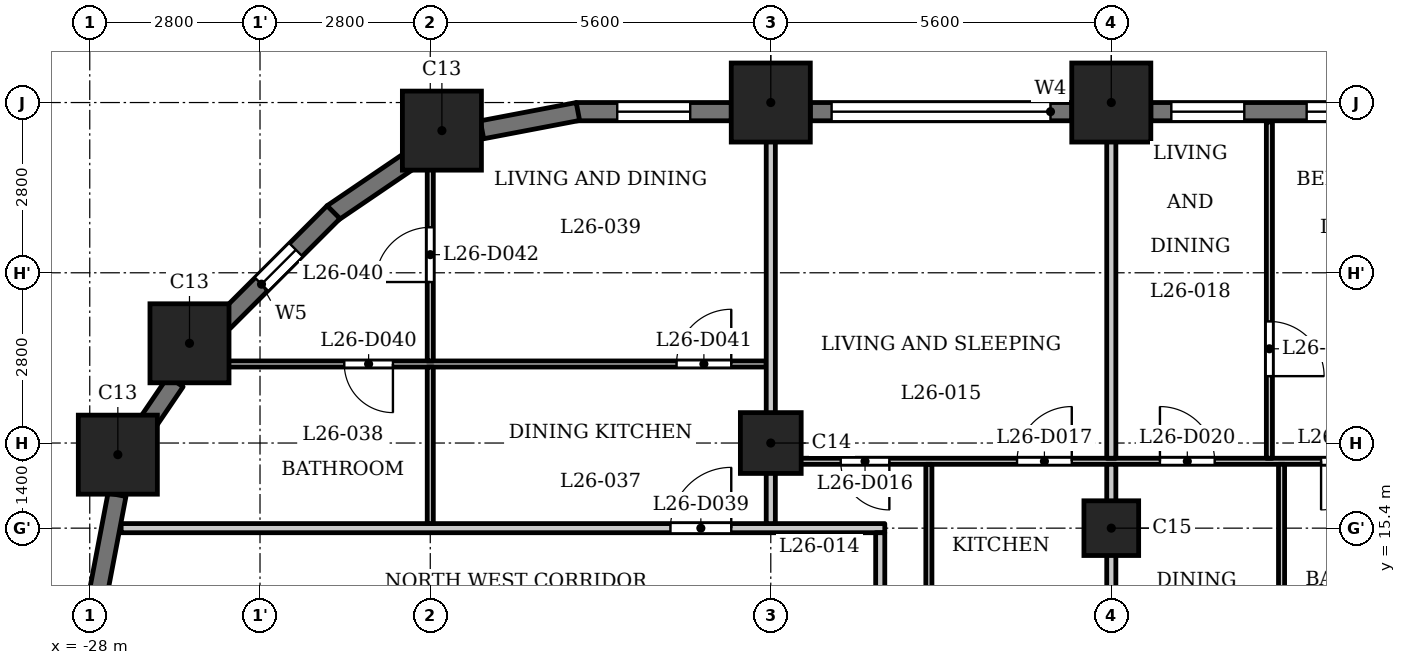
"""IFC4 building model, lengths in metres.
Left out: names, types, materials, properties, quantities, classifications, styles, units other than length and angle.
Written with IfcOpenShell. Run it as: python <this file> out.ifc"""

import sys

from ifc_helpers import new_model, si_unit, direction, frame, frame_2d, origin, origin_2d, place, context, subcontext, project, spatial, rectangle, extrude, element, fill, save


model = new_model("IFC4")
c1 = context("Model", 3, precision=1e-05, world=origin(), true_north=direction((0.0, 1.0)))
c2 = subcontext(c1, "Body", "Model", "MODEL_VIEW")
j1 = project(units=[si_unit("LENGTHUNIT", "METRE"), si_unit("PLANEANGLEUNIT", "RADIAN")], contexts=[c1])
p1 = place(None, origin())
s1 = spatial("IfcSite", under=j1, at=p1, CompositionType="ELEMENT")
p2 = place(p1, origin())
s2 = spatial("IfcBuilding", under=s1, at=p2, CompositionType="ELEMENT")
p3 = place(p2, frame((0.0, 0.0, 104.3)))
s3 = spatial("IfcBuildingStorey", under=s2, at=p3, CompositionType="ELEMENT", Elevation=104.3)
for number, where, z_axis, x_axis in (
    (1, (-11.2, 22.4, 0.0), (0.0, 0.0, 1.0), (1.0, 0.0, 0.0)),
    (2, (-16.8, 22.4, 0.0), (0.0, 0.0, 1.0), (1.0, 0.0, 0.0)),
    (3, (-22.209, 21.938, 0.0), (0.0, 0.0, 1.0), (1.0, 0.0, 0.0)),
    (4, (-26.36, 18.44, 0.0), (0.0, 0.0, 1.0), (1.0, 0.0, 0.0)),
    (5, (-27.538, 16.609, 0.0), (0.0, 0.0, 1.0), (1.0, 0.0, 0.0)),
):
    element("IfcColumn", number, at=place(p3, frame(where, z_axis=z_axis, x_axis=x_axis)), inside=s3, PredefinedType="COLUMN", context=c2, shape_type="SweptSolid", body=[
        extrude(rectangle(XDim=1.3, YDim=1.3, at=origin_2d()), origin(), (0.0, 0.0, 1.0), 3.5),
    ])
p4 = place(p3, frame((-16.8, 16.8, 0.0), z_axis=(0.0, 0.0, 1.0), x_axis=(1.0, 0.0, 0.0)))
e6 = element("IfcColumn", 6, at=p4, inside=s3, PredefinedType="COLUMN", context=c2, shape_type="SweptSolid", body=[
    extrude(rectangle(XDim=1.0, YDim=1.0, at=origin_2d()), origin(), (0.0, 0.0, 1.0), 3.5),
])
p5 = place(p3, frame((-11.2, 15.4, 0.0), z_axis=(0.0, 0.0, 1.0), x_axis=(1.0, 0.0, 0.0)))
e7 = element("IfcColumn", 7, at=p5, inside=s3, PredefinedType="COLUMN", context=c2, shape_type="SweptSolid", body=[
    extrude(rectangle(XDim=0.9, YDim=0.9, at=origin_2d()), origin(), (0.0, 0.0, 1.0), 3.5),
])
p6 = place(p3, frame((-6.25, 22.25, 0.0), z_axis=(0.0, 0.0, 1.0), x_axis=(-1.0, 0.0, 0.0)))
e8 = element("IfcWall", 8, at=p6, inside=s3, PredefinedType="SOLIDWALL", context=c2, shape_type="SweptSolid", body=[
    extrude(rectangle(XDim=4.3, YDim=0.3, at=frame_2d((2.15, 0.0))), origin(), (0.0, 0.0, 1.0), 2.4),
])
p7 = place(p6, frame((0.538, 0.0, 0.6)))
e9 = element("IfcOpeningElement", 9, at=p7, cuts=e8, PredefinedType="OPENING", context=c2, shape_type="SweptSolid", body=[
    extrude(rectangle(XDim=1.2, YDim=1.55, at=frame_2d((0.6, 0.775))), frame((0.0, 0.16, 0.0), z_axis=(0.0, -1.0, 0.0), x_axis=(1.0, 0.0, 0.0)), (0.0, 0.0, 1.0), 0.32),
])
p8 = place(p6, frame((2.762, 0.0, 0.6)))
e10 = element("IfcOpeningElement", 10, at=p8, cuts=e8, PredefinedType="OPENING", context=c2, shape_type="SweptSolid", body=[
    extrude(rectangle(XDim=1.2, YDim=1.55, at=frame_2d((0.6, 0.775))), frame((0.0, 0.16, 0.0), z_axis=(0.0, -1.0, 0.0), x_axis=(1.0, 0.0, 0.0)), (0.0, 0.0, 1.0), 0.32),
])
p9 = place(p3, frame((-11.85, 22.25, 0.0), z_axis=(0.0, 0.0, 1.0), x_axis=(-1.0, 0.0, 0.0)))
e11 = element("IfcWall", 11, at=p9, inside=s3, PredefinedType="SOLIDWALL", context=c2, shape_type="SweptSolid", body=[
    extrude(rectangle(XDim=4.3, YDim=0.3, at=frame_2d((2.15, 0.0))), origin(), (0.0, 0.0, 1.0), 2.4),
])
p10 = place(p9, frame((0.35, 0.0, 1.2)))
e12 = element("IfcOpeningElement", 12, at=p10, cuts=e11, PredefinedType="OPENING", context=c2, shape_type="SweptSolid", body=[
    extrude(rectangle(XDim=3.6, YDim=0.95, at=frame_2d((1.8, 0.475))), frame((0.0, 0.16, 0.0), z_axis=(0.0, -1.0, 0.0), x_axis=(1.0, 0.0, 0.0)), (0.0, 0.0, 1.0), 0.32),
])
p11 = place(p3, frame((-17.45, 22.25, 0.0), z_axis=(0.0, 0.0, 1.0), x_axis=(-1.0, 0.0, 0.0)))
e13 = element("IfcWall", 13, at=p11, inside=s3, PredefinedType="SOLIDWALL", context=c2, shape_type="SweptSolid", body=[
    extrude(rectangle(XDim=2.55, YDim=0.3, at=frame_2d((1.275, 0.0))), origin(), (0.0, 0.0, 1.0), 2.4),
])
p12 = place(p11, frame((0.675, 0.0, 0.6)))
e14 = element("IfcOpeningElement", 14, at=p12, cuts=e13, PredefinedType="OPENING", context=c2, shape_type="SweptSolid", body=[
    extrude(rectangle(XDim=1.2, YDim=1.55, at=frame_2d((0.6, 0.775))), frame((0.0, 0.16, 0.0), z_axis=(0.0, -1.0, 0.0), x_axis=(1.0, 0.0, 0.0)), (0.0, 0.0, 1.0), 0.32),
])
for number, where, z_axis, x_axis in (
    (15, (-19.972, 22.253, 0.0), (0.0, 0.0, 1.0), (-0.982, -0.187, 0.0)),
    (16, (-22.684, 21.482, 0.0), (0.0, 0.0, 1.0), (-0.827, -0.562, 0.0)),
):
    element("IfcWall", number, at=place(p3, frame(where, z_axis=z_axis, x_axis=x_axis)), inside=s3, PredefinedType="SOLIDWALL", context=c2, shape_type="SweptSolid", body=[
        extrude(rectangle(XDim=1.606, YDim=0.3, at=frame_2d((0.803, 0.0))), origin(), (0.0, 0.0, 1.0), 2.4),
    ])
p13 = place(p3, frame((-23.991, 20.597, 0.0), z_axis=(0.0, 0.0, 1.0), x_axis=(-0.707106781187, -0.707106781187, 0.0)))
e17 = element("IfcWall", 17, at=p13, inside=s3, PredefinedType="SOLIDWALL", context=c2, shape_type="SweptSolid", body=[
    extrude(rectangle(XDim=2.55, YDim=0.3, at=frame_2d((1.275, 0.0))), origin(), (0.0, 0.0, 1.0), 2.4),
])
p14 = place(p13, frame((0.875, 0.0, 0.6)))
e18 = element("IfcOpeningElement", 18, at=p14, cuts=e17, PredefinedType="OPENING", context=c2, shape_type="SweptSolid", body=[
    extrude(rectangle(XDim=0.8, YDim=1.55, at=frame_2d((0.4, 0.775))), frame((0.0, 0.16, 0.0), z_axis=(0.0, -1.0, 0.0), x_axis=(1.0, 0.0, 0.0)), (0.0, 0.0, 1.0), 0.32),
])
p15 = place(p3, frame((-26.589, 17.81, 0.0), z_axis=(0.0, 0.0, 1.0), x_axis=(-0.562066330934, -0.827092159091, 0.0)))
e19 = element("IfcWall", 19, at=p15, inside=s3, PredefinedType="SOLIDWALL", context=c2, shape_type="SweptSolid", body=[
    extrude(rectangle(XDim=0.877, YDim=0.3, at=frame_2d((0.438, 0.0))), origin(), (0.0, 0.0, 1.0), 3.2),
])
p16 = place(p3, frame((-27.552, 15.949, 0.0), z_axis=(0.0, 0.0, 1.0), x_axis=(-0.187279751651, -0.982306619453, 0.0)))
e20 = element("IfcWall", 20, at=p16, inside=s3, PredefinedType="SOLIDWALL", context=c2, shape_type="SweptSolid", body=[
    extrude(rectangle(XDim=1.606, YDim=0.3, at=frame_2d((0.803, 0.0))), origin(), (0.0, 0.0, 1.0), 2.4),
])
p17 = place(p3, frame((-27.484, 15.4, 0.0), z_axis=(0.0, 0.0, 1.0), x_axis=(1.0, 0.0, 0.0)))
e21 = element("IfcWall", 21, at=p17, inside=s3, PredefinedType="PARTITIONING", context=c2, shape_type="SweptSolid", body=[
    extrude(rectangle(XDim=12.559, YDim=0.15, at=frame_2d((6.279, 0.0))), origin(), (0.0, 0.0, 1.0), 3.2),
])
p18 = place(p17, frame((9.034, 0.0, 0.0)))
e22 = element("IfcOpeningElement", 22, at=p18, cuts=e21, PredefinedType="OPENING", context=c2, shape_type="SweptSolid", body=[
    extrude(rectangle(XDim=1.0, YDim=2.1, at=frame_2d((0.5, 1.05))), frame((0.0, 0.085, 0.0), z_axis=(0.0, -1.0, 0.0), x_axis=(1.0, 0.0, 0.0)), (0.0, 0.0, 1.0), 0.17),
])
p19 = place(p3, frame((-16.725, 16.5, 0.0), z_axis=(0.0, 0.0, 1.0), x_axis=(1.0, 0.0, 0.0)))
e23 = element("IfcWall", 23, at=p19, inside=s3, PredefinedType="PARTITIONING", context=c2, shape_type="SweptSolid", body=[
    extrude(rectangle(XDim=33.45, YDim=0.1, at=frame_2d((16.725, 0.0))), origin(), (0.0, 0.0, 1.0), 3.2),
])
p20 = place(p19, frame((1.075, 0.0, 0.0)))
e24 = element("IfcOpeningElement", 24, at=p20, cuts=e23, PredefinedType="OPENING", context=c2, shape_type="SweptSolid", body=[
    extrude(rectangle(XDim=0.8, YDim=2.1, at=frame_2d((0.4, 1.05))), frame((0.0, 0.06, 0.0), z_axis=(0.0, -1.0, 0.0), x_axis=(1.0, 0.0, 0.0)), (0.0, 0.0, 1.0), 0.12),
])
p21 = place(p19, frame((3.975, 0.0, 0.0)))
e25 = element("IfcOpeningElement", 25, at=p21, cuts=e23, PredefinedType="OPENING", context=c2, shape_type="SweptSolid", body=[
    extrude(rectangle(XDim=0.9, YDim=2.1, at=frame_2d((0.45, 1.05))), frame((0.0, 0.06, 0.0), z_axis=(0.0, -1.0, 0.0), x_axis=(1.0, 0.0, 0.0)), (0.0, 0.0, 1.0), 0.12),
])
p22 = place(p19, frame((8.975, 0.0, 0.0)))
e26 = element("IfcOpeningElement", 26, at=p22, cuts=e23, PredefinedType="OPENING", context=c2, shape_type="SweptSolid", body=[
    extrude(rectangle(XDim=0.8, YDim=2.1, at=frame_2d((0.4, 1.05))), frame((0.0, 0.06, 0.0), z_axis=(0.0, -1.0, 0.0), x_axis=(1.0, 0.0, 0.0)), (0.0, 0.0, 1.0), 0.12),
])
p23 = place(p19, frame((6.325, 0.0, 0.0)))
e27 = element("IfcOpeningElement", 27, at=p23, cuts=e23, PredefinedType="OPENING", context=c2, shape_type="SweptSolid", body=[
    extrude(rectangle(XDim=0.9, YDim=2.1, at=frame_2d((0.45, 1.05))), frame((0.0, 0.06, 0.0), z_axis=(0.0, -1.0, 0.0), x_axis=(1.0, 0.0, 0.0)), (0.0, 0.0, 1.0), 0.12),
])
p24 = place(p19, frame((20.725, 0.0, 0.0)))
e28 = element("IfcOpeningElement", 28, at=p24, cuts=e23, PredefinedType="OPENING", context=c2, shape_type="SweptSolid", body=[
    extrude(rectangle(XDim=0.8, YDim=2.1, at=frame_2d((0.4, 1.05))), frame((0.0, 0.06, 0.0), z_axis=(0.0, -1.0, 0.0), x_axis=(1.0, 0.0, 0.0)), (0.0, 0.0, 1.0), 0.12),
])
p25 = place(p19, frame((17.775, 0.0, 0.0)))
e29 = element("IfcOpeningElement", 29, at=p25, cuts=e23, PredefinedType="OPENING", context=c2, shape_type="SweptSolid", body=[
    extrude(rectangle(XDim=0.9, YDim=2.1, at=frame_2d((0.45, 1.05))), frame((0.0, 0.06, 0.0), z_axis=(0.0, -1.0, 0.0), x_axis=(1.0, 0.0, 0.0)), (0.0, 0.0, 1.0), 0.12),
])
p26 = place(p19, frame((11.825, 0.0, 0.0)))
e30 = element("IfcOpeningElement", 30, at=p26, cuts=e23, PredefinedType="OPENING", context=c2, shape_type="SweptSolid", body=[
    extrude(rectangle(XDim=0.9, YDim=2.1, at=frame_2d((0.45, 1.05))), frame((0.0, 0.06, 0.0), z_axis=(0.0, -1.0, 0.0), x_axis=(1.0, 0.0, 0.0)), (0.0, 0.0, 1.0), 0.12),
])
p27 = place(p19, frame((15.175, 0.0, 0.0)))
e31 = element("IfcOpeningElement", 31, at=p27, cuts=e23, PredefinedType="OPENING", context=c2, shape_type="SweptSolid", body=[
    extrude(rectangle(XDim=0.9, YDim=2.1, at=frame_2d((0.45, 1.05))), frame((0.0, 0.06, 0.0), z_axis=(0.0, -1.0, 0.0), x_axis=(1.0, 0.0, 0.0)), (0.0, 0.0, 1.0), 0.12),
])
p28 = place(p19, frame((22.975, 0.0, 0.0)))
e32 = element("IfcOpeningElement", 32, at=p28, cuts=e23, PredefinedType="OPENING", context=c2, shape_type="SweptSolid", body=[
    extrude(rectangle(XDim=0.8, YDim=2.1, at=frame_2d((0.4, 1.05))), frame((0.0, 0.06, 0.0), z_axis=(0.0, -1.0, 0.0), x_axis=(1.0, 0.0, 0.0)), (0.0, 0.0, 1.0), 0.12),
])
p29 = place(p19, frame((24.875, 0.0, 0.0)))
e33 = element("IfcOpeningElement", 33, at=p29, cuts=e23, PredefinedType="OPENING", context=c2, shape_type="SweptSolid", body=[
    extrude(rectangle(XDim=0.9, YDim=2.1, at=frame_2d((0.45, 1.05))), frame((0.0, 0.06, 0.0), z_axis=(0.0, -1.0, 0.0), x_axis=(1.0, 0.0, 0.0)), (0.0, 0.0, 1.0), 0.12),
])
p30 = place(p19, frame((32.075, 0.0, 0.0)))
e34 = element("IfcOpeningElement", 34, at=p30, cuts=e23, PredefinedType="OPENING", context=c2, shape_type="SweptSolid", body=[
    extrude(rectangle(XDim=0.8, YDim=2.1, at=frame_2d((0.4, 1.05))), frame((0.0, 0.06, 0.0), z_axis=(0.0, -1.0, 0.0), x_axis=(1.0, 0.0, 0.0)), (0.0, 0.0, 1.0), 0.12),
])
p31 = place(p19, frame((29.175, 0.0, 0.0)))
e35 = element("IfcOpeningElement", 35, at=p31, cuts=e23, PredefinedType="OPENING", context=c2, shape_type="SweptSolid", body=[
    extrude(rectangle(XDim=0.9, YDim=2.1, at=frame_2d((0.45, 1.05))), frame((0.0, 0.06, 0.0), z_axis=(0.0, -1.0, 0.0), x_axis=(1.0, 0.0, 0.0)), (0.0, 0.0, 1.0), 0.12),
])
p32 = place(p3, frame((-26.44, 18.1, 0.0), z_axis=(0.0, 0.0, 1.0), x_axis=(1.0, 0.0, 0.0)))
e36 = element("IfcWall", 36, at=p32, inside=s3, PredefinedType="PARTITIONING", context=c2, shape_type="SweptSolid", body=[
    extrude(rectangle(XDim=9.565, YDim=0.1, at=frame_2d((4.782, 0.0))), origin(), (0.0, 0.0, 1.0), 3.2),
])
p33 = place(p32, frame((2.626, 0.0, 0.0)))
e37 = element("IfcOpeningElement", 37, at=p33, cuts=e36, PredefinedType="OPENING", context=c2, shape_type="SweptSolid", body=[
    extrude(rectangle(XDim=0.8, YDim=2.1, at=frame_2d((0.4, 1.05))), frame((0.0, 0.06, 0.0), z_axis=(0.0, -1.0, 0.0), x_axis=(1.0, 0.0, 0.0)), (0.0, 0.0, 1.0), 0.12),
])
p34 = place(p32, frame((8.09, 0.0, 0.0)))
e38 = element("IfcOpeningElement", 38, at=p34, cuts=e36, PredefinedType="OPENING", context=c2, shape_type="SweptSolid", body=[
    extrude(rectangle(XDim=0.9, YDim=2.1, at=frame_2d((0.45, 1.05))), frame((0.0, 0.06, 0.0), z_axis=(0.0, -1.0, 0.0), x_axis=(1.0, 0.0, 0.0)), (0.0, 0.0, 1.0), 0.12),
])
p35 = place(p3, frame((-22.4, 15.475, 0.0), z_axis=(0.0, 0.0, 1.0), x_axis=(0.0, 1.0, 0.0)))
e39 = element("IfcWall", 39, at=p35, inside=s3, PredefinedType="PARTITIONING", context=c2, shape_type="SweptSolid", body=[
    extrude(rectangle(XDim=2.575, YDim=0.1, at=frame_2d((1.288, 0.0))), origin(), (0.0, 0.0, 1.0), 3.2),
])
p36 = place(p3, frame((-22.4, 18.15, 0.0), z_axis=(0.0, 0.0, 1.0), x_axis=(0.0, 1.0, 0.0)))
e40 = element("IfcWall", 40, at=p36, inside=s3, PredefinedType="PARTITIONING", context=c2, shape_type="SweptSolid", body=[
    extrude(rectangle(XDim=3.57, YDim=0.1, at=frame_2d((1.785, 0.0))), origin(), (0.0, 0.0, 1.0), 3.2),
])
p37 = place(p36, frame((1.298, 0.0, 0.0)))
e41 = element("IfcOpeningElement", 41, at=p37, cuts=e40, PredefinedType="OPENING", context=c2, shape_type="SweptSolid", body=[
    extrude(rectangle(XDim=0.9, YDim=2.1, at=frame_2d((0.45, 1.05))), frame((0.0, 0.06, 0.0), z_axis=(0.0, -1.0, 0.0), x_axis=(1.0, 0.0, 0.0)), (0.0, 0.0, 1.0), 0.12),
])
p38 = place(p3, frame((-16.8, 15.475, 0.0), z_axis=(0.0, 0.0, 1.0), x_axis=(0.0, 1.0, 0.0)))
e42 = element("IfcWall", 42, at=p38, inside=s3, PredefinedType="PARTITIONING", context=c2, shape_type="SweptSolid", body=[
    extrude(rectangle(XDim=7.555, YDim=0.15, at=frame_2d((3.777, 0.0))), origin(), (0.0, 0.0, 1.0), 3.2),
])
p39 = place(p3, frame((-15.0, 13.275, 0.0), z_axis=(0.0, 0.0, 1.0), x_axis=(0.0, 1.0, 0.0)))
e43 = element("IfcWall", 43, at=p39, inside=s3, PredefinedType="PARTITIONING", context=c2, shape_type="SweptSolid", body=[
    extrude(rectangle(XDim=2.05, YDim=0.15, at=frame_2d((1.025, 0.0))), origin(), (0.0, 0.0, 1.0), 3.2),
])
p40 = place(p3, frame((-14.2, 13.275, 0.0), z_axis=(0.0, 0.0, 1.0), x_axis=(0.0, 1.0, 0.0)))
e44 = element("IfcWall", 44, at=p40, inside=s3, PredefinedType="PARTITIONING", context=c2, shape_type="SweptSolid", body=[
    extrude(rectangle(XDim=3.175, YDim=0.1, at=frame_2d((1.587, 0.0))), origin(), (0.0, 0.0, 1.0), 3.2),
])
p41 = place(p3, frame((-11.2, 13.275, 0.0), z_axis=(0.0, 0.0, 1.0), x_axis=(0.0, 1.0, 0.0)))
e45 = element("IfcWall", 45, at=p41, inside=s3, PredefinedType="PARTITIONING", context=c2, shape_type="SweptSolid", body=[
    extrude(rectangle(XDim=3.175, YDim=0.15, at=frame_2d((1.587, 0.0))), origin(), (0.0, 0.0, 1.0), 3.2),
])
p42 = place(p3, frame((-11.2, 16.55, 0.0), z_axis=(0.0, 0.0, 1.0), x_axis=(0.0, 1.0, 0.0)))
e46 = element("IfcWall", 46, at=p42, inside=s3, PredefinedType="PARTITIONING", context=c2, shape_type="SweptSolid", body=[
    extrude(rectangle(XDim=6.48, YDim=0.15, at=frame_2d((3.24, 0.0))), origin(), (0.0, 0.0, 1.0), 3.2),
])
p43 = place(p3, frame((-8.6, 16.55, 0.0), z_axis=(0.0, 0.0, 1.0), x_axis=(0.0, 1.0, 0.0)))
e47 = element("IfcWall", 47, at=p43, inside=s3, PredefinedType="PARTITIONING", context=c2, shape_type="SweptSolid", body=[
    extrude(rectangle(XDim=5.53, YDim=0.1, at=frame_2d((2.765, 0.0))), origin(), (0.0, 0.0, 1.0), 3.2),
])
p44 = place(p43, frame((1.35, 0.0, 0.0)))
e48 = element("IfcOpeningElement", 48, at=p44, cuts=e47, PredefinedType="OPENING", context=c2, shape_type="SweptSolid", body=[
    extrude(rectangle(XDim=0.9, YDim=2.1, at=frame_2d((0.45, 1.05))), frame((0.0, 0.06, 0.0), z_axis=(0.0, -1.0, 0.0), x_axis=(1.0, 0.0, 0.0)), (0.0, 0.0, 1.0), 0.12),
])
p45 = place(p3, frame((-8.4, 13.275, 0.0), z_axis=(0.0, 0.0, 1.0), x_axis=(0.0, 1.0, 0.0)))
e49 = element("IfcWall", 49, at=p45, inside=s3, PredefinedType="PARTITIONING", context=c2, shape_type="SweptSolid", body=[
    extrude(rectangle(XDim=3.175, YDim=0.1, at=frame_2d((1.587, 0.0))), origin(), (0.0, 0.0, 1.0), 3.2),
])
p46 = place(p20, origin())
e50 = element("IfcDoor", 50, at=p46, inside=s3, OperationType="SINGLE_SWING_RIGHT", PredefinedType="DOOR", context=c2, shape_type="SweptSolid", body=[
    extrude(rectangle(XDim=0.8, YDim=2.1, at=frame_2d((0.4, 1.05))), frame((0.0, 0.025, 0.0), z_axis=(0.0, -1.0, 0.0), x_axis=(1.0, 0.0, 0.0)), (0.0, 0.0, 1.0), 0.05),
])
fill(e24, e50)
p47 = place(p21, origin())
e51 = element("IfcDoor", 51, at=p47, inside=s3, OperationType="SINGLE_SWING_LEFT", PredefinedType="DOOR", context=c2, shape_type="SweptSolid", body=[
    extrude(rectangle(XDim=0.9, YDim=2.1, at=frame_2d((0.45, 1.05))), frame((0.0, 0.025, 0.0), z_axis=(0.0, -1.0, 0.0), x_axis=(1.0, 0.0, 0.0)), (0.0, 0.0, 1.0), 0.05),
])
fill(e25, e51)
p48 = place(p22, origin())
e52 = element("IfcDoor", 52, at=p48, inside=s3, OperationType="SINGLE_SWING_LEFT", PredefinedType="DOOR", context=c2, shape_type="SweptSolid", body=[
    extrude(rectangle(XDim=0.8, YDim=2.1, at=frame_2d((0.4, 1.05))), frame((0.0, 0.025, 0.0), z_axis=(0.0, -1.0, 0.0), x_axis=(1.0, 0.0, 0.0)), (0.0, 0.0, 1.0), 0.05),
])
fill(e26, e52)
p49 = place(p23, origin())
e53 = element("IfcDoor", 53, at=p49, inside=s3, OperationType="SINGLE_SWING_RIGHT", PredefinedType="DOOR", context=c2, shape_type="SweptSolid", body=[
    extrude(rectangle(XDim=0.9, YDim=2.1, at=frame_2d((0.45, 1.05))), frame((0.0, 0.025, 0.0), z_axis=(0.0, -1.0, 0.0), x_axis=(1.0, 0.0, 0.0)), (0.0, 0.0, 1.0), 0.05),
])
fill(e27, e53)
p50 = place(p44, origin())
e54 = element("IfcDoor", 54, at=p50, inside=s3, OperationType="SINGLE_SWING_LEFT", PredefinedType="DOOR", context=c2, shape_type="SweptSolid", body=[
    extrude(rectangle(XDim=0.9, YDim=2.1, at=frame_2d((0.45, 1.05))), frame((0.0, 0.025, 0.0), z_axis=(0.0, -1.0, 0.0), x_axis=(1.0, 0.0, 0.0)), (0.0, 0.0, 1.0), 0.05),
])
fill(e48, e54)
p51 = place(p18, origin())
e55 = element("IfcDoor", 55, at=p51, inside=s3, OperationType="SINGLE_SWING_LEFT", PredefinedType="DOOR", context=c2, shape_type="SweptSolid", body=[
    extrude(rectangle(XDim=1.0, YDim=2.1, at=frame_2d((0.5, 1.05))), frame((0.0, 0.025, 0.0), z_axis=(0.0, -1.0, 0.0), x_axis=(1.0, 0.0, 0.0)), (0.0, 0.0, 1.0), 0.05),
])
fill(e22, e55)
p52 = place(p33, origin())
e56 = element("IfcDoor", 56, at=p52, inside=s3, OperationType="SINGLE_SWING_RIGHT", PredefinedType="DOOR", context=c2, shape_type="SweptSolid", body=[
    extrude(rectangle(XDim=0.8, YDim=2.1, at=frame_2d((0.4, 1.05))), frame((0.0, 0.025, 0.0), z_axis=(0.0, -1.0, 0.0), x_axis=(1.0, 0.0, 0.0)), (0.0, 0.0, 1.0), 0.05),
])
fill(e37, e56)
p53 = place(p34, origin())
e57 = element("IfcDoor", 57, at=p53, inside=s3, OperationType="SINGLE_SWING_LEFT", PredefinedType="DOOR", context=c2, shape_type="SweptSolid", body=[
    extrude(rectangle(XDim=0.9, YDim=2.1, at=frame_2d((0.45, 1.05))), frame((0.0, 0.025, 0.0), z_axis=(0.0, -1.0, 0.0), x_axis=(1.0, 0.0, 0.0)), (0.0, 0.0, 1.0), 0.05),
])
fill(e38, e57)
p54 = place(p37, origin())
e58 = element("IfcDoor", 58, at=p54, inside=s3, OperationType="SINGLE_SWING_RIGHT", PredefinedType="DOOR", context=c2, shape_type="SweptSolid", body=[
    extrude(rectangle(XDim=0.9, YDim=2.1, at=frame_2d((0.45, 1.05))), frame((0.0, 0.025, 0.0), z_axis=(0.0, -1.0, 0.0), x_axis=(1.0, 0.0, 0.0)), (0.0, 0.0, 1.0), 0.05),
])
fill(e41, e58)
p55 = place(p7, origin())
e59 = element("IfcWindow", 59, at=p55, inside=s3, PartitioningType="SINGLE_PANEL", PredefinedType="WINDOW", context=c2, shape_type="SweptSolid", body=[
    extrude(rectangle(XDim=1.2, YDim=1.55, at=frame_2d((0.6, 0.775))), frame((0.0, 0.03, 0.0), z_axis=(0.0, -1.0, 0.0), x_axis=(1.0, 0.0, 0.0)), (0.0, 0.0, 1.0), 0.06),
])
fill(e9, e59)
p56 = place(p8, origin())
e60 = element("IfcWindow", 60, at=p56, inside=s3, PartitioningType="SINGLE_PANEL", PredefinedType="WINDOW", context=c2, shape_type="SweptSolid", body=[
    extrude(rectangle(XDim=1.2, YDim=1.55, at=frame_2d((0.6, 0.775))), frame((0.0, 0.03, 0.0), z_axis=(0.0, -1.0, 0.0), x_axis=(1.0, 0.0, 0.0)), (0.0, 0.0, 1.0), 0.06),
])
fill(e10, e60)
p57 = place(p10, origin())
e61 = element("IfcWindow", 61, at=p57, inside=s3, PartitioningType="SINGLE_PANEL", PredefinedType="WINDOW", context=c2, shape_type="SweptSolid", body=[
    extrude(rectangle(XDim=3.6, YDim=0.95, at=frame_2d((1.8, 0.475))), frame((0.0, 0.03, 0.0), z_axis=(0.0, -1.0, 0.0), x_axis=(1.0, 0.0, 0.0)), (0.0, 0.0, 1.0), 0.06),
])
fill(e12, e61)
p58 = place(p12, origin())
e62 = element("IfcWindow", 62, at=p58, inside=s3, PartitioningType="SINGLE_PANEL", PredefinedType="WINDOW", context=c2, shape_type="SweptSolid", body=[
    extrude(rectangle(XDim=1.2, YDim=1.55, at=frame_2d((0.6, 0.775))), frame((0.0, 0.03, 0.0), z_axis=(0.0, -1.0, 0.0), x_axis=(1.0, 0.0, 0.0)), (0.0, 0.0, 1.0), 0.06),
])
fill(e14, e62)
p59 = place(p14, origin())
e63 = element("IfcWindow", 63, at=p59, inside=s3, PartitioningType="SINGLE_PANEL", PredefinedType="WINDOW", context=c2, shape_type="SweptSolid", body=[
    extrude(rectangle(XDim=0.8, YDim=1.55, at=frame_2d((0.4, 0.775))), frame((0.0, 0.03, 0.0), z_axis=(0.0, -1.0, 0.0), x_axis=(1.0, 0.0, 0.0)), (0.0, 0.0, 1.0), 0.06),
])
fill(e18, e63)
save(model, sys.argv[1])
